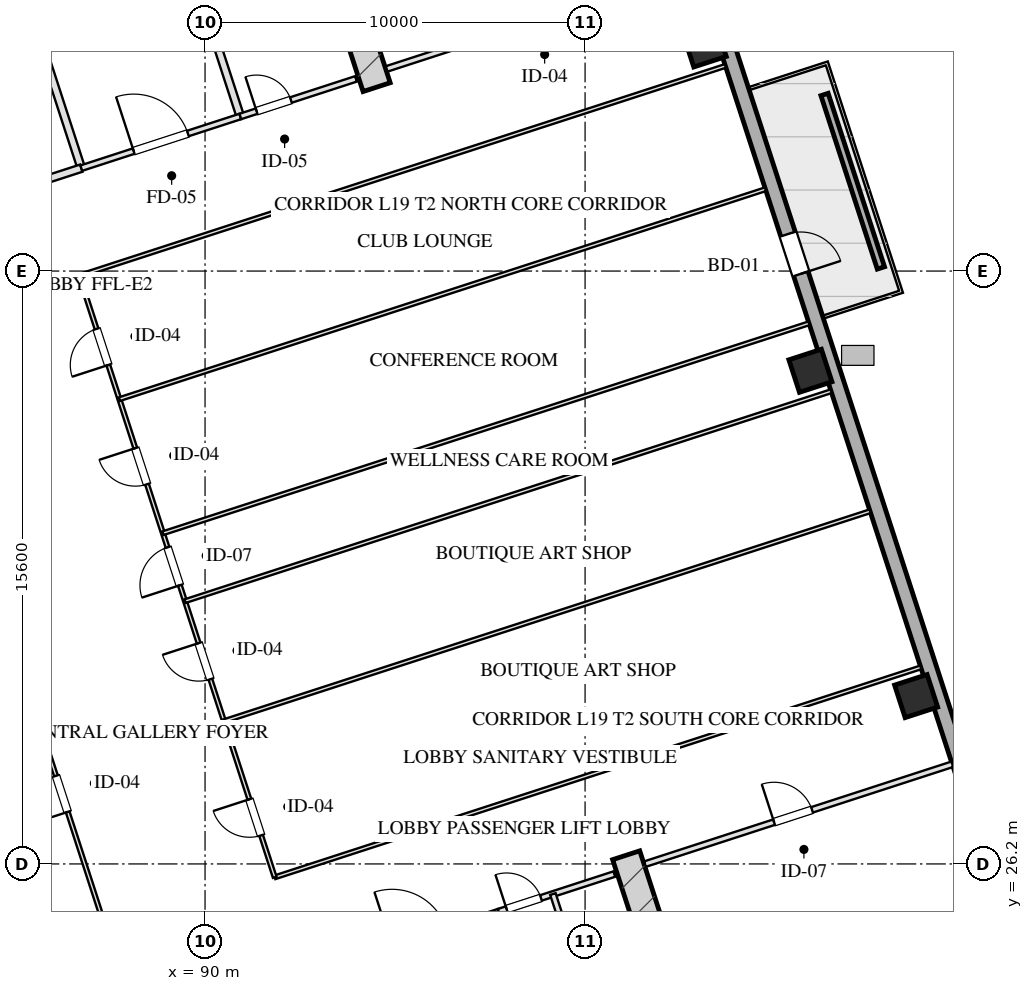
"""IFC4 building model, lengths in metres.
Left out: names, types, materials, properties, quantities, classifications, styles, units other than length and angle.
Written with IfcOpenShell. Run it as: python <this file> out.ifc"""

import sys

from ifc_helpers import new_model, si_unit, direction, frame, frame_2d, origin, origin_2d, place, context, subcontext, project, spatial, rectangle, hollow_rectangle, extrude, element, fill, save


model = new_model("IFC4")
c1 = context("Model", 3, precision=1e-05, world=origin(), true_north=direction((0.0, 1.0)))
c2 = subcontext(c1, "Body", "Model", "MODEL_VIEW")
j1 = project(units=[si_unit("LENGTHUNIT", "METRE"), si_unit("PLANEANGLEUNIT", "RADIAN")], contexts=[c1])
p1 = place(None, origin())
s1 = spatial("IfcSite", under=j1, at=p1, CompositionType="ELEMENT")
p2 = place(p1, origin())
s2 = spatial("IfcBuilding", under=s1, at=p2, CompositionType="ELEMENT")
p3 = place(p2, frame((0.0, 0.0, 78.2)))
s3 = spatial("IfcBuildingStorey", under=s2, at=p3, CompositionType="ELEMENT", Elevation=78.2)
for number, where, z_axis, x_axis in (
    (1, (101.082, 26.429, 0.0), (0.0, 0.0, 1.0), (0.309, -0.951, 0.0)),
    (2, (94.515, 46.639, 0.0), (0.0, 0.0, 1.0), (-0.309, 0.951, 0.0)),
):
    element("IfcWall", number, at=place(p3, frame(where, z_axis=z_axis, x_axis=x_axis)), inside=s3, PredefinedType="SHEAR", context=c2, shape_type="SweptSolid", body=[
        extrude(rectangle(XDim=9.63, YDim=0.75, at=frame_2d((4.815, 0.0))), origin(), (0.0, 0.0, 1.0), 3.45),
    ])
for number, where, z_axis, x_axis in (
    (3, (108.711, 30.616, 0.0), (0.0, 0.0, 1.0), (0.951, 0.309, 0.0)),
    (4, (105.93, 39.176, 0.0), (0.0, 0.0, 1.0), (0.951, 0.309, 0.0)),
    (5, (103.149, 47.736, 0.0), (0.0, 0.0, 1.0), (0.951, 0.309, 0.0)),
):
    element("IfcColumn", number, at=place(p3, frame(where, z_axis=z_axis, x_axis=x_axis)), inside=s3, PredefinedType="COLUMN", context=c2, shape_type="SweptSolid", body=[
        extrude(hollow_rectangle(XDim=0.9, YDim=0.9, WallThickness=0.032, at=origin_2d()), origin(), (0.0, 0.0, 1.0), 3.451),
    ])
p4 = place(p3, frame((99.284, 61.41, 0.0), z_axis=(0.0, 0.0, 1.0), x_axis=(0.309017542002, -0.95105633836, 0.0)))
e6 = element("IfcWall", 6, at=p4, inside=s3, PredefinedType="SOLIDWALL", context=c2, shape_type="SweptSolid", body=[
    extrude(rectangle(XDim=46.4, YDim=0.4, at=frame_2d((23.2, 0.0))), origin(), (0.0, 0.0, 1.0), 2.61),
])
p5 = place(p4, frame((19.596, 0.0, 0.0)))
e7 = element("IfcOpeningElement", 7, at=p5, cuts=e6, PredefinedType="OPENING", context=c2, shape_type="SweptSolid", body=[
    extrude(rectangle(XDim=1.1, YDim=2.15, at=frame_2d((0.55, 1.075))), frame((0.0, 0.21, 0.0), z_axis=(0.0, -1.0, 0.0), x_axis=(1.0, 0.0, 0.0)), (0.0, 0.0, 1.0), 0.42),
])
p6 = place(p3, frame((107.785, 41.882, 0.0), z_axis=(0.0, 0.0, 1.0), x_axis=(-0.309032019345, 0.951051634255, 0.0)))
e8 = element("IfcWall", 8, at=p6, inside=s3, PredefinedType="PARAPET", context=c2, shape_type="SweptSolid", body=[
    extrude(rectangle(XDim=4.8, YDim=0.2, at=frame_2d((2.4, 0.0))), origin(), (0.0, 0.0, 1.0), 0.75),
])
p7 = place(p3, frame((97.727, 24.944, 0.0), z_axis=(0.0, 0.0, 1.0), x_axis=(0.309016001439, -0.951056838919, 0.0)))
e9 = element("IfcWall", 9, at=p7, inside=s3, PredefinedType="PARTITIONING", context=c2, shape_type="SweptSolid", body=[
    extrude(rectangle(XDim=8.43, YDim=0.2, at=frame_2d((4.215, 0.0))), origin(), (0.0, 0.0, 1.0), 3.175),
])
p8 = place(p3, frame((93.542, 23.585, 0.0), z_axis=(0.0, 0.0, 1.0), x_axis=(0.951063829732, 0.308994485023, 0.0)))
e10 = element("IfcWall", 10, at=p8, inside=s3, PredefinedType="PARTITIONING", context=c2, shape_type="SweptSolid", body=[
    extrude(rectangle(XDim=4.4, YDim=0.15, at=frame_2d((2.2, 0.0))), origin(), (0.0, 0.0, 1.0), 3.175),
])
p9 = place(p8, frame((1.45, 0.0, 0.0)))
e11 = element("IfcOpeningElement", 11, at=p9, cuts=e10, PredefinedType="OPENING", context=c2, shape_type="SweptSolid", body=[
    extrude(rectangle(XDim=1.5, YDim=2.05, at=frame_2d((0.75, 1.025))), frame((0.0, 0.085, 0.0), z_axis=(0.0, -1.0, 0.0), x_axis=(1.0, 0.0, 0.0)), (0.0, 0.0, 1.0), 0.17),
])
p10 = place(p3, frame((97.727, 24.944, 0.0), z_axis=(0.0, 0.0, 1.0), x_axis=(0.951036872128, 0.309077446369, 0.0)))
e12 = element("IfcWall", 12, at=p10, inside=s3, PredefinedType="PARTITIONING", context=c2, shape_type="SweptSolid", body=[
    extrude(rectangle(XDim=3.2, YDim=0.15, at=frame_2d((1.6, 0.0))), origin(), (0.0, 0.0, 1.0), 3.175),
])
p11 = place(p10, frame((0.22, 0.0, 0.0)))
e13 = element("IfcOpeningElement", 13, at=p11, cuts=e12, PredefinedType="OPENING", context=c2, shape_type="SweptSolid", body=[
    extrude(rectangle(XDim=0.95, YDim=2.05, at=frame_2d((0.475, 1.025))), frame((0.0, 0.085, 0.0), z_axis=(0.0, -1.0, 0.0), x_axis=(1.0, 0.0, 0.0)), (0.0, 0.0, 1.0), 0.17),
])
p12 = place(p3, frame((99.153, 25.408, 0.0), z_axis=(0.0, 0.0, 1.0), x_axis=(0.309016001439, -0.951056838919, 0.0)))
e14 = element("IfcWall", 14, at=p12, inside=s3, PredefinedType="PARTITIONING", context=c2, shape_type="SweptSolid", body=[
    extrude(rectangle(XDim=8.43, YDim=0.15, at=frame_2d((4.215, 0.0))), origin(), (0.0, 0.0, 1.0), 3.175),
])
p13 = place(p12, frame((2.55, 0.0, 0.0)))
e15 = element("IfcOpeningElement", 15, at=p13, cuts=e14, PredefinedType="OPENING", context=c2, shape_type="SweptSolid", body=[
    extrude(rectangle(XDim=0.95, YDim=2.05, at=frame_2d((0.475, 1.025))), frame((0.0, 0.085, 0.0), z_axis=(0.0, -1.0, 0.0), x_axis=(1.0, 0.0, 0.0)), (0.0, 0.0, 1.0), 0.17),
])
p14 = place(p12, frame((4.7, 0.0, 0.0)))
e16 = element("IfcOpeningElement", 16, at=p14, cuts=e14, PredefinedType="OPENING", context=c2, shape_type="SweptSolid", body=[
    extrude(rectangle(XDim=0.9, YDim=2.05, at=frame_2d((0.45, 1.025))), frame((0.0, 0.085, 0.0), z_axis=(0.0, -1.0, 0.0), x_axis=(1.0, 0.0, 0.0)), (0.0, 0.0, 1.0), 0.17),
])
p15 = place(p12, frame((6.8, 0.0, 0.0)))
e17 = element("IfcOpeningElement", 17, at=p15, cuts=e14, PredefinedType="OPENING", context=c2, shape_type="SweptSolid", body=[
    extrude(rectangle(XDim=0.9, YDim=2.05, at=frame_2d((0.45, 1.025))), frame((0.0, 0.085, 0.0), z_axis=(0.0, -1.0, 0.0), x_axis=(1.0, 0.0, 0.0)), (0.0, 0.0, 1.0), 0.17),
])
p16 = place(p3, frame((86.743, 44.508, 0.0), z_axis=(0.0, 0.0, 1.0), x_axis=(-0.309016001439, 0.951056838919, 0.0)))
e18 = element("IfcWall", 18, at=p16, inside=s3, PredefinedType="PARTITIONING", context=c2, shape_type="SweptSolid", body=[
    extrude(rectangle(XDim=8.43, YDim=0.2, at=frame_2d((4.215, 0.0))), origin(), (0.0, 0.0, 1.0), 3.175),
])
p17 = place(p3, frame((83.101, 43.324, 0.0), z_axis=(0.0, 0.0, 1.0), x_axis=(0.951052804469, 0.309028417967, 0.0)))
e19 = element("IfcWall", 19, at=p17, inside=s3, PredefinedType="PARTITIONING", context=c2, shape_type="SweptSolid", body=[
    extrude(rectangle(XDim=3.83, YDim=0.2, at=frame_2d((1.915, 0.0))), origin(), (0.0, 0.0, 1.0), 3.175),
])
p18 = place(p17, frame((1.35, 0.0, 0.0)))
e20 = element("IfcOpeningElement", 20, at=p18, cuts=e19, PredefinedType="OPENING", context=c2, shape_type="SweptSolid", body=[
    extrude(rectangle(XDim=1.2, YDim=2.05, at=frame_2d((0.6, 1.025))), frame((0.0, 0.11, 0.0), z_axis=(0.0, -1.0, 0.0), x_axis=(1.0, 0.0, 0.0)), (0.0, 0.0, 1.0), 0.22),
])
p19 = place(p3, frame((90.928, 45.868, 0.0), z_axis=(0.0, 0.0, 1.0), x_axis=(-0.309042196757, 0.951048327176, 0.0)))
e21 = element("IfcWall", 21, at=p19, inside=s3, PredefinedType="PARTITIONING", context=c2, shape_type="SweptSolid", body=[
    extrude(rectangle(XDim=8.43, YDim=0.2, at=frame_2d((4.215, 0.0))), origin(), (0.0, 0.0, 1.0), 3.175),
])
p20 = place(p3, frame((86.743, 44.508, 0.0), z_axis=(0.0, 0.0, 1.0), x_axis=(0.951063829732, 0.308994485023, 0.0)))
e22 = element("IfcWall", 22, at=p20, inside=s3, PredefinedType="PARTITIONING", context=c2, shape_type="SweptSolid", body=[
    extrude(rectangle(XDim=4.4, YDim=0.15, at=frame_2d((2.2, 0.0))), origin(), (0.0, 0.0, 1.0), 3.175),
])
p21 = place(p20, frame((1.45, 0.0, 0.0)))
e23 = element("IfcOpeningElement", 23, at=p21, cuts=e22, PredefinedType="OPENING", context=c2, shape_type="SweptSolid", body=[
    extrude(rectangle(XDim=1.5, YDim=2.05, at=frame_2d((0.75, 1.025))), frame((0.0, 0.085, 0.0), z_axis=(0.0, -1.0, 0.0), x_axis=(1.0, 0.0, 0.0)), (0.0, 0.0, 1.0), 0.17),
])
p22 = place(p3, frame((90.928, 45.868, 0.0), z_axis=(0.0, 0.0, 1.0), x_axis=(0.951059297078, 0.309008435874, 0.0)))
e24 = element("IfcWall", 24, at=p22, inside=s3, PredefinedType="PARTITIONING", context=c2, shape_type="SweptSolid", body=[
    extrude(rectangle(XDim=3.2, YDim=0.15, at=frame_2d((1.6, 0.0))), origin(), (0.0, 0.0, 1.0), 3.175),
])
p23 = place(p22, frame((0.45, 0.0, 0.0)))
e25 = element("IfcOpeningElement", 25, at=p23, cuts=e24, PredefinedType="OPENING", context=c2, shape_type="SweptSolid", body=[
    extrude(rectangle(XDim=0.95, YDim=2.05, at=frame_2d((0.475, 1.025))), frame((0.0, 0.085, 0.0), z_axis=(0.0, -1.0, 0.0), x_axis=(1.0, 0.0, 0.0)), (0.0, 0.0, 1.0), 0.17),
])
p24 = place(p3, frame((101.578, 26.196, 0.0), z_axis=(0.0, 0.0, 1.0), x_axis=(0.951062770994, 0.308997743729, 0.0)))
e26 = element("IfcWall", 26, at=p24, inside=s3, PredefinedType="PARTITIONING", context=c2, shape_type="SweptSolid", body=[
    extrude(rectangle(XDim=8.5, YDim=0.15, at=frame_2d((4.25, 0.0))), origin(), (0.0, 0.0, 1.0), 3.175),
])
p25 = place(p24, frame((3.57, 0.0, 0.0)))
e27 = element("IfcOpeningElement", 27, at=p25, cuts=e26, PredefinedType="OPENING", context=c2, shape_type="SweptSolid", body=[
    extrude(rectangle(XDim=1.05, YDim=2.05, at=frame_2d((0.525, 1.025))), frame((0.0, 0.085, 0.0), z_axis=(0.0, -1.0, 0.0), x_axis=(1.0, 0.0, 0.0)), (0.0, 0.0, 1.0), 0.17),
])
p26 = place(p3, frame((94.78, 47.119, 0.0), z_axis=(0.0, 0.0, 1.0), x_axis=(0.951054329824, 0.309023723562, 0.0)))
e28 = element("IfcWall", 28, at=p26, inside=s3, PredefinedType="PARTITIONING", context=c2, shape_type="SweptSolid", body=[
    extrude(rectangle(XDim=8.5, YDim=0.15, at=frame_2d((4.25, 0.0))), origin(), (0.0, 0.0, 1.0), 3.175),
])
p27 = place(p26, frame((3.57, 0.0, 0.0)))
e29 = element("IfcOpeningElement", 29, at=p27, cuts=e28, PredefinedType="OPENING", context=c2, shape_type="SweptSolid", body=[
    extrude(rectangle(XDim=1.0, YDim=2.05, at=frame_2d((0.5, 1.025))), frame((0.0, 0.085, 0.0), z_axis=(0.0, -1.0, 0.0), x_axis=(1.0, 0.0, 0.0)), (0.0, 0.0, 1.0), 0.17),
])
p28 = place(p3, frame((91.834, 25.848, 0.0), z_axis=(0.0, 0.0, 1.0), x_axis=(0.951055746746, 0.309019362795, 0.0)))
e30 = element("IfcWall", 30, at=p28, inside=s3, PredefinedType="MOVABLE", context=c2, shape_type="SweptSolid", body=[
    extrude(rectangle(XDim=17.875, YDim=0.1, at=frame_2d((8.938, 0.0))), origin(), (0.0, 0.0, 1.0), 3.175),
])
p29 = place(p3, frame((86.692, 41.673, 0.0), z_axis=(0.0, 0.0, 1.0), x_axis=(0.951057050993, 0.309015348739, 0.0)))
e31 = element("IfcWall", 31, at=p29, inside=s3, PredefinedType="MOVABLE", context=c2, shape_type="SweptSolid", body=[
    extrude(rectangle(XDim=17.875, YDim=0.1, at=frame_2d((8.938, 0.0))), origin(), (0.0, 0.0, 1.0), 3.175),
])
p30 = place(p3, frame((87.412, 24.411, 0.0), z_axis=(0.0, 0.0, 1.0), x_axis=(-0.309022042254, 0.951054876125, 0.0)))
e32 = element("IfcWall", 32, at=p30, inside=s3, PredefinedType="MOVABLE", context=c2, shape_type="SweptSolid", body=[
    extrude(rectangle(XDim=16.64, YDim=0.1, at=frame_2d((8.32, 0.0))), origin(), (0.0, 0.0, 1.0), 3.175),
])
p31 = place(p30, frame((3.32, 0.0, 0.0)))
e33 = element("IfcOpeningElement", 33, at=p31, cuts=e32, PredefinedType="OPENING", context=c2, shape_type="SweptSolid", body=[
    extrude(rectangle(XDim=1.0, YDim=2.05, at=frame_2d((0.5, 1.025))), frame((0.0, 0.06, 0.0), z_axis=(0.0, -1.0, 0.0), x_axis=(1.0, 0.0, 0.0)), (0.0, 0.0, 1.0), 0.12),
])
p32 = place(p30, frame((11.64, 0.0, 0.0)))
e34 = element("IfcOpeningElement", 34, at=p32, cuts=e32, PredefinedType="OPENING", context=c2, shape_type="SweptSolid", body=[
    extrude(rectangle(XDim=1.0, YDim=2.05, at=frame_2d((0.5, 1.025))), frame((0.0, 0.06, 0.0), z_axis=(0.0, -1.0, 0.0), x_axis=(1.0, 0.0, 0.0)), (0.0, 0.0, 1.0), 0.12),
])
p33 = place(p3, frame((91.834, 25.848, 0.0), z_axis=(0.0, 0.0, 1.0), x_axis=(-0.30901773025, 0.951056277195, 0.0)))
e35 = element("IfcWall", 35, at=p33, inside=s3, PredefinedType="MOVABLE", context=c2, shape_type="SweptSolid", body=[
    extrude(rectangle(XDim=16.64, YDim=0.1, at=frame_2d((8.32, 0.0))), origin(), (0.0, 0.0, 1.0), 3.175),
])
p34 = place(p33, frame((1.16, 0.0, 0.0)))
e36 = element("IfcOpeningElement", 36, at=p34, cuts=e35, PredefinedType="OPENING", context=c2, shape_type="SweptSolid", body=[
    extrude(rectangle(XDim=1.0, YDim=2.05, at=frame_2d((0.5, 1.025))), frame((0.0, 0.06, 0.0), z_axis=(0.0, -1.0, 0.0), x_axis=(1.0, 0.0, 0.0)), (0.0, 0.0, 1.0), 0.12),
])
p35 = place(p33, frame((5.48, 0.0, 0.0)))
e37 = element("IfcOpeningElement", 37, at=p35, cuts=e35, PredefinedType="OPENING", context=c2, shape_type="SweptSolid", body=[
    extrude(rectangle(XDim=1.0, YDim=2.05, at=frame_2d((0.5, 1.025))), frame((0.0, 0.06, 0.0), z_axis=(0.0, -1.0, 0.0), x_axis=(1.0, 0.0, 0.0)), (0.0, 0.0, 1.0), 0.12),
])
p36 = place(p33, frame((8.08, 0.0, 0.0)))
e38 = element("IfcOpeningElement", 38, at=p36, cuts=e35, PredefinedType="OPENING", context=c2, shape_type="SweptSolid", body=[
    extrude(rectangle(XDim=1.05, YDim=2.05, at=frame_2d((0.525, 1.025))), frame((0.0, 0.06, 0.0), z_axis=(0.0, -1.0, 0.0), x_axis=(1.0, 0.0, 0.0)), (0.0, 0.0, 1.0), 0.12),
])
p37 = place(p33, frame((10.874, 0.0, 0.0)))
e39 = element("IfcOpeningElement", 39, at=p37, cuts=e35, PredefinedType="OPENING", context=c2, shape_type="SweptSolid", body=[
    extrude(rectangle(XDim=1.0, YDim=2.05, at=frame_2d((0.5, 1.025))), frame((0.0, 0.06, 0.0), z_axis=(0.0, -1.0, 0.0), x_axis=(1.0, 0.0, 0.0)), (0.0, 0.0, 1.0), 0.12),
])
p38 = place(p33, frame((14.174, 0.0, 0.0)))
e40 = element("IfcOpeningElement", 40, at=p38, cuts=e35, PredefinedType="OPENING", context=c2, shape_type="SweptSolid", body=[
    extrude(rectangle(XDim=1.0, YDim=2.05, at=frame_2d((0.5, 1.025))), frame((0.0, 0.06, 0.0), z_axis=(0.0, -1.0, 0.0), x_axis=(1.0, 0.0, 0.0)), (0.0, 0.0, 1.0), 0.12),
])
for number, where, z_axis, x_axis in (
    (41, (90.499, 29.956, 0.0), (0.0, 0.0, 1.0), (0.951, 0.309, 0.0)),
    (42, (89.473, 33.114, 0.0), (0.0, 0.0, 1.0), (0.951, 0.309, 0.0)),
):
    element("IfcWall", number, at=place(p3, frame(where, z_axis=z_axis, x_axis=x_axis)), inside=s3, PredefinedType="MOVABLE", context=c2, shape_type="SweptSolid", body=[
        extrude(rectangle(XDim=17.875, YDim=0.1, at=frame_2d((8.938, 0.0))), origin(), (0.0, 0.0, 1.0), 3.175),
    ])
for number, where, z_axis, x_axis in (
    (43, (88.892, 34.902, 0.0), (0.0, 0.0, 1.0), (0.951, 0.309, 0.0)),
    (44, (87.746, 38.429, 0.0), (0.0, 0.0, 1.0), (0.951, 0.309, 0.0)),
):
    element("IfcWall", number, at=place(p3, frame(where, z_axis=z_axis, x_axis=x_axis)), inside=s3, PredefinedType="MOVABLE", context=c2, shape_type="SweptSolid", body=[
        extrude(rectangle(XDim=17.875, YDim=0.1, at=frame_2d((8.938, 0.0))), origin(), (0.0, 0.0, 1.0), 3.175),
    ])
p39 = place(p5, origin())
e45 = element("IfcDoor", 45, at=p39, inside=s3, OperationType="SINGLE_SWING_RIGHT", PredefinedType="DOOR", context=c2, shape_type="SweptSolid", body=[
    extrude(rectangle(XDim=1.1, YDim=2.15, at=frame_2d((0.55, 1.075))), frame((0.0, 0.025, 0.0), z_axis=(0.0, -1.0, 0.0), x_axis=(1.0, 0.0, 0.0)), (0.0, 0.0, 1.0), 0.05),
])
fill(e7, e45)
p40 = place(p11, origin())
e46 = element("IfcDoor", 46, at=p40, inside=s3, OperationType="SINGLE_SWING_LEFT", PredefinedType="DOOR", context=c2, shape_type="SweptSolid", body=[
    extrude(rectangle(XDim=0.95, YDim=2.05, at=frame_2d((0.475, 1.025))), frame((0.0, 0.025, 0.0), z_axis=(0.0, -1.0, 0.0), x_axis=(1.0, 0.0, 0.0)), (0.0, 0.0, 1.0), 0.05),
])
fill(e13, e46)
p41 = place(p21, origin())
e47 = element("IfcDoor", 47, at=p41, inside=s3, OperationType="SINGLE_SWING_LEFT", PredefinedType="DOOR", context=c2, shape_type="SweptSolid", body=[
    extrude(rectangle(XDim=1.5, YDim=2.05, at=frame_2d((0.75, 1.025))), frame((0.0, 0.025, 0.0), z_axis=(0.0, -1.0, 0.0), x_axis=(1.0, 0.0, 0.0)), (0.0, 0.0, 1.0), 0.05),
])
fill(e23, e47)
p42 = place(p23, origin())
e48 = element("IfcDoor", 48, at=p42, inside=s3, OperationType="SINGLE_SWING_LEFT", PredefinedType="DOOR", context=c2, shape_type="SweptSolid", body=[
    extrude(rectangle(XDim=0.95, YDim=2.05, at=frame_2d((0.475, 1.025))), frame((0.0, 0.025, 0.0), z_axis=(0.0, -1.0, 0.0), x_axis=(1.0, 0.0, 0.0)), (0.0, 0.0, 1.0), 0.05),
])
fill(e25, e48)
p43 = place(p25, origin())
e49 = element("IfcDoor", 49, at=p43, inside=s3, OperationType="SINGLE_SWING_LEFT", PredefinedType="DOOR", context=c2, shape_type="SweptSolid", body=[
    extrude(rectangle(XDim=1.05, YDim=2.05, at=frame_2d((0.525, 1.025))), frame((0.0, 0.025, 0.0), z_axis=(0.0, -1.0, 0.0), x_axis=(1.0, 0.0, 0.0)), (0.0, 0.0, 1.0), 0.05),
])
fill(e27, e49)
p44 = place(p31, origin())
e50 = element("IfcDoor", 50, at=p44, inside=s3, OperationType="SINGLE_SWING_LEFT", PredefinedType="DOOR", context=c2, shape_type="SweptSolid", body=[
    extrude(rectangle(XDim=1.0, YDim=2.05, at=frame_2d((0.5, 1.025))), frame((0.0, 0.025, 0.0), z_axis=(0.0, -1.0, 0.0), x_axis=(1.0, 0.0, 0.0)), (0.0, 0.0, 1.0), 0.05),
])
fill(e33, e50)
p45 = place(p34, origin())
e51 = element("IfcDoor", 51, at=p45, inside=s3, OperationType="SINGLE_SWING_RIGHT", PredefinedType="DOOR", context=c2, shape_type="SweptSolid", body=[
    extrude(rectangle(XDim=1.0, YDim=2.05, at=frame_2d((0.5, 1.025))), frame((0.0, 0.025, 0.0), z_axis=(0.0, -1.0, 0.0), x_axis=(1.0, 0.0, 0.0)), (0.0, 0.0, 1.0), 0.05),
])
fill(e36, e51)
p46 = place(p35, origin())
e52 = element("IfcDoor", 52, at=p46, inside=s3, OperationType="SINGLE_SWING_RIGHT", PredefinedType="DOOR", context=c2, shape_type="SweptSolid", body=[
    extrude(rectangle(XDim=1.0, YDim=2.05, at=frame_2d((0.5, 1.025))), frame((0.0, 0.025, 0.0), z_axis=(0.0, -1.0, 0.0), x_axis=(1.0, 0.0, 0.0)), (0.0, 0.0, 1.0), 0.05),
])
fill(e37, e52)
p47 = place(p36, origin())
e53 = element("IfcDoor", 53, at=p47, inside=s3, OperationType="SINGLE_SWING_LEFT", PredefinedType="DOOR", context=c2, shape_type="SweptSolid", body=[
    extrude(rectangle(XDim=1.05, YDim=2.05, at=frame_2d((0.525, 1.025))), frame((0.0, 0.025, 0.0), z_axis=(0.0, -1.0, 0.0), x_axis=(1.0, 0.0, 0.0)), (0.0, 0.0, 1.0), 0.05),
])
fill(e38, e53)
p48 = place(p37, origin())
e54 = element("IfcDoor", 54, at=p48, inside=s3, OperationType="SINGLE_SWING_RIGHT", PredefinedType="DOOR", context=c2, shape_type="SweptSolid", body=[
    extrude(rectangle(XDim=1.0, YDim=2.05, at=frame_2d((0.5, 1.025))), frame((0.0, 0.025, 0.0), z_axis=(0.0, -1.0, 0.0), x_axis=(1.0, 0.0, 0.0)), (0.0, 0.0, 1.0), 0.05),
])
fill(e39, e54)
p49 = place(p38, origin())
e55 = element("IfcDoor", 55, at=p49, inside=s3, OperationType="SINGLE_SWING_LEFT", PredefinedType="DOOR", context=c2, shape_type="SweptSolid", body=[
    extrude(rectangle(XDim=1.0, YDim=2.05, at=frame_2d((0.5, 1.025))), frame((0.0, 0.025, 0.0), z_axis=(0.0, -1.0, 0.0), x_axis=(1.0, 0.0, 0.0)), (0.0, 0.0, 1.0), 0.05),
])
fill(e40, e55)
save(model, sys.argv[1])
